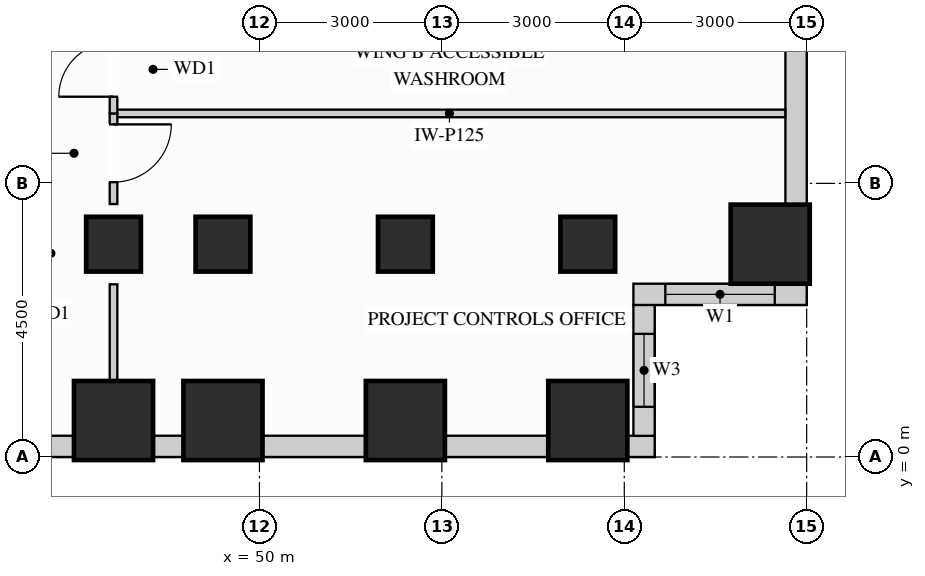
"""IFC4 building model, lengths in metres.
Left out: names, types, materials, properties, quantities, classifications, styles, units other than length and angle.
Written with IfcOpenShell. Run it as: python <this file> out.ifc"""

import sys

from ifc_helpers import new_model, si_unit, direction, frame, frame_2d, origin, origin_2d, place, context, subcontext, project, spatial, rectangle, extrude, source, transform, mapped, element, fill, save


model = new_model("IFC4")
c1 = context("Model", 3, precision=1e-05, world=origin(), true_north=direction((0.0, 1.0)))
c2 = subcontext(c1, "Body", "Model", "MODEL_VIEW")
j1 = project(units=[si_unit("LENGTHUNIT", "METRE"), si_unit("PLANEANGLEUNIT", "RADIAN")], contexts=[c1])
p1 = place(None, origin())
s1 = spatial("IfcSite", under=j1, at=p1, CompositionType="ELEMENT")
p2 = place(p1, origin())
s2 = spatial("IfcBuilding", under=s1, at=p2, CompositionType="ELEMENT")
p3 = place(p2, frame((0.0, 0.0, 47.7)))
s3 = spatial("IfcBuildingStorey", under=s2, at=p3, CompositionType="ELEMENT", Elevation=47.7)
m1 = source(origin(), c2, "Body", "SweptSolid", [
    extrude(rectangle(XDim=0.9, YDim=0.9, at=origin_2d()), origin(), (0.0, 0.0, 1.0), 3.38),
])
for number, where, z_axis, x_axis in (
    (1, (47.6, 3.5, 0.0), (0.0, 0.0, 1.0), (1.0, 0.0, 0.0)),
    (2, (49.4, 3.5, 0.0), (0.0, 0.0, 1.0), (1.0, 0.0, 0.0)),
    (3, (52.4, 3.5, 0.0), (0.0, 0.0, 1.0), (1.0, 0.0, 0.0)),
    (4, (55.4, 3.5, 0.0), (0.0, 0.0, 1.0), (1.0, 0.0, 0.0)),
):
    element("IfcColumn", number, at=place(p3, frame(where, z_axis=z_axis, x_axis=x_axis)), inside=s3, PredefinedType="COLUMN", context=c2, shape_type="MappedRepresentation", body=[
        mapped(m1, transform((0.0, 0.0, 0.0), x_axis=(1.0, 0.0, 0.0), y_axis=(0.0, 1.0, 0.0), z_axis=(0.0, 0.0, 1.0))),
    ])
m2 = source(origin(), c2, "Body", "SweptSolid", [
    extrude(rectangle(XDim=1.3, YDim=1.3, at=origin_2d()), origin(), (0.0, 0.0, 1.0), 3.38),
])
for number, where, z_axis, x_axis in (
    (5, (58.4, 3.5, 0.0), (0.0, 0.0, 1.0), (1.0, 0.0, 0.0)),
    (6, (47.6, 0.6, 0.0), (0.0, 0.0, 1.0), (1.0, 0.0, 0.0)),
    (7, (49.4, 0.6, 0.0), (0.0, 0.0, 1.0), (1.0, 0.0, 0.0)),
    (8, (52.4, 0.6, 0.0), (0.0, 0.0, 1.0), (1.0, 0.0, 0.0)),
    (9, (55.4, 0.6, 0.0), (0.0, 0.0, 1.0), (1.0, 0.0, 0.0)),
):
    element("IfcColumn", number, at=place(p3, frame(where, z_axis=z_axis, x_axis=x_axis)), inside=s3, PredefinedType="COLUMN", context=c2, shape_type="MappedRepresentation", body=[
        mapped(m2, transform((0.0, 0.0, 0.0), x_axis=(1.0, 0.0, 0.0), y_axis=(0.0, 1.0, 0.0), z_axis=(0.0, 0.0, 1.0))),
    ])
p4 = place(p3, frame((40.648, 0.175, 0.0), z_axis=(0.0, 0.0, 1.0), x_axis=(1.0, 0.0, 0.0)))
e10 = element("IfcWall", 10, at=p4, inside=s3, PredefinedType="SOLIDWALL", context=c2, shape_type="SweptSolid", body=[
    extrude(rectangle(XDim=6.304, YDim=0.35, at=frame_2d((3.152, 0.0))), origin(), (0.0, 0.0, 1.0), 2.51),
])
p5 = place(p4, frame((0.687, 0.0, 0.78)))
e11 = element("IfcOpeningElement", 11, at=p5, cuts=e10, PredefinedType="OPENING", context=c2, shape_type="SweptSolid", body=[
    extrude(rectangle(XDim=1.8, YDim=1.55, at=frame_2d((0.9, 0.775))), frame((0.0, 0.185, 0.0), z_axis=(0.0, -1.0, 0.0), x_axis=(1.0, 0.0, 0.0)), (0.0, 0.0, 1.0), 0.37),
])
p6 = place(p4, frame((2.855, 0.0, 0.78)))
e12 = element("IfcOpeningElement", 12, at=p6, cuts=e10, PredefinedType="OPENING", context=c2, shape_type="SweptSolid", body=[
    extrude(rectangle(XDim=1.8, YDim=1.55, at=frame_2d((0.9, 0.775))), frame((0.0, 0.185, 0.0), z_axis=(0.0, -1.0, 0.0), x_axis=(1.0, 0.0, 0.0)), (0.0, 0.0, 1.0), 0.37),
])
m3 = source(origin(), c2, "Body", "SweptSolid", [
    extrude(rectangle(XDim=0.504, YDim=0.35, at=frame_2d((0.252, 0.0))), origin(), (0.0, 0.0, 1.0), 3.365),
])
p7 = place(p3, frame((48.248, 0.175, 0.0), z_axis=(0.0, 0.0, 1.0), x_axis=(1.0, 0.0, 0.0)))
e13 = element("IfcWall", 13, at=p7, inside=s3, PredefinedType="SOLIDWALL", context=c2, shape_type="MappedRepresentation", body=[
    mapped(m3, transform((0.0, 0.0, 0.0), x_axis=(1.0, 0.0, 0.0), y_axis=(0.0, 1.0, 0.0), z_axis=(0.0, 0.0, 1.0))),
])
m4 = source(origin(), c2, "Body", "SweptSolid", [
    extrude(rectangle(XDim=1.704, YDim=0.35, at=frame_2d((0.852, 0.0))), origin(), (0.0, 0.0, 1.0), 2.51),
])
for number, where, z_axis, x_axis in (
    (14, (50.048, 0.175, 0.0), (0.0, 0.0, 1.0), (1.0, 0.0, 0.0)),
    (15, (53.048, 0.175, 0.0), (0.0, 0.0, 1.0), (1.0, 0.0, 0.0)),
):
    element("IfcWall", number, at=place(p3, frame(where, z_axis=z_axis, x_axis=x_axis)), inside=s3, PredefinedType="SOLIDWALL", context=c2, shape_type="MappedRepresentation", body=[
        mapped(m4, transform((0.0, 0.0, 0.0), x_axis=(1.0, 0.0, 0.0), y_axis=(0.0, 1.0, 0.0), z_axis=(0.0, 0.0, 1.0))),
    ])
m5 = source(origin(), c2, "Body", "SweptSolid", [
    extrude(rectangle(XDim=0.452, YDim=0.35, at=frame_2d((0.226, 0.0))), origin(), (0.0, 0.0, 1.0), 3.365),
])
p8 = place(p3, frame((56.048, 0.175, 0.0), z_axis=(0.0, 0.0, 1.0), x_axis=(1.0, 0.0, 0.0)))
e16 = element("IfcWall", 16, at=p8, inside=s3, PredefinedType="SOLIDWALL", context=c2, shape_type="MappedRepresentation", body=[
    mapped(m5, transform((0.0, 0.0, 0.0), x_axis=(1.0, 0.0, 0.0), y_axis=(0.0, 1.0, 0.0), z_axis=(0.0, 0.0, 1.0))),
])
p9 = place(p3, frame((56.325, 0.348, 0.0), z_axis=(0.0, 0.0, 1.0), x_axis=(0.0, 1.0, 0.0)))
e17 = element("IfcWall", 17, at=p9, inside=s3, PredefinedType="SOLIDWALL", context=c2, shape_type="SweptSolid", body=[
    extrude(rectangle(XDim=2.154, YDim=0.35, at=frame_2d((1.077, 0.0))), origin(), (0.0, 0.0, 1.0), 3.365),
])
p10 = place(p9, frame((0.477, 0.0, 0.78)))
e18 = element("IfcOpeningElement", 18, at=p10, cuts=e17, PredefinedType="OPENING", context=c2, shape_type="SweptSolid", body=[
    extrude(rectangle(XDim=1.2, YDim=2.1, at=frame_2d((0.6, 1.05))), frame((0.0, 0.185, 0.0), z_axis=(0.0, -1.0, 0.0), x_axis=(1.0, 0.0, 0.0)), (0.0, 0.0, 1.0), 0.37),
])
p11 = place(p3, frame((56.15, 2.675, 0.0), z_axis=(0.0, 0.0, 1.0), x_axis=(1.0, 0.0, 0.0)))
e19 = element("IfcWall", 19, at=p11, inside=s3, PredefinedType="SOLIDWALL", context=c2, shape_type="SweptSolid", body=[
    extrude(rectangle(XDim=2.85, YDim=0.35, at=frame_2d((1.425, 0.0))), origin(), (0.0, 0.0, 1.0), 3.365),
])
p12 = place(p11, frame((0.525, 0.0, 0.78)))
e20 = element("IfcOpeningElement", 20, at=p12, cuts=e19, PredefinedType="OPENING", context=c2, shape_type="SweptSolid", body=[
    extrude(rectangle(XDim=1.8, YDim=2.1, at=frame_2d((0.9, 1.05))), frame((0.0, 0.185, 0.0), z_axis=(0.0, -1.0, 0.0), x_axis=(1.0, 0.0, 0.0)), (0.0, 0.0, 1.0), 0.37),
])
m6 = source(origin(), c2, "Body", "SweptSolid", [
    extrude(rectangle(XDim=3.204, YDim=0.35, at=frame_2d((1.602, 0.0))), origin(), (0.0, 0.0, 1.0), 2.51),
])
p13 = place(p3, frame((58.825, 4.148, 0.0), z_axis=(0.0, 0.0, 1.0), x_axis=(0.0, 1.0, 0.0)))
e21 = element("IfcWall", 21, at=p13, inside=s3, PredefinedType="SOLIDWALL", context=c2, shape_type="MappedRepresentation", body=[
    mapped(m6, transform((0.0, 0.0, 0.0), x_axis=(1.0, 0.0, 0.0), y_axis=(0.0, 1.0, 0.0), z_axis=(0.0, 0.0, 1.0))),
])
m7 = source(origin(), c2, "Body", "SweptSolid", [
    extrude(rectangle(XDim=11.048, YDim=0.125, at=frame_2d((5.524, 0.0))), origin(), (0.0, 0.0, 1.0), 3.365),
])
p14 = place(p3, frame((47.6, 5.65, 0.0), z_axis=(0.0, 0.0, 1.0), x_axis=(1.0, 0.0, 0.0)))
e22 = element("IfcWall", 22, at=p14, inside=s3, PredefinedType="PARTITIONING", context=c2, shape_type="MappedRepresentation", body=[
    mapped(m7, transform((0.0, 0.0, 0.0), x_axis=(1.0, 0.0, 0.0), y_axis=(0.0, 1.0, 0.0), z_axis=(0.0, 0.0, 1.0))),
])
p15 = place(p3, frame((47.6, 4.16, 0.0), z_axis=(0.0, 0.0, 1.0), x_axis=(0.0, 1.0, 0.0)))
e23 = element("IfcWall", 23, at=p15, inside=s3, PredefinedType="PARTITIONING", context=c2, shape_type="SweptSolid", body=[
    extrude(rectangle(XDim=1.49, YDim=0.125, at=frame_2d((0.745, 0.0))), origin(), (0.0, 0.0, 1.0), 2.67),
])
p16 = place(p15, frame((0.36, 0.0, 0.0)))
e24 = element("IfcOpeningElement", 24, at=p16, cuts=e23, PredefinedType="OPENING", context=c2, shape_type="SweptSolid", body=[
    extrude(rectangle(XDim=0.95, YDim=2.15, at=frame_2d((0.475, 1.075))), frame((0.0, 0.073, 0.0), z_axis=(0.0, -1.0, 0.0), x_axis=(1.0, 0.0, 0.0)), (0.0, 0.0, 1.0), 0.145),
])
m8 = source(origin(), c2, "Body", "SweptSolid", [
    extrude(rectangle(XDim=1.58, YDim=0.125, at=frame_2d((0.79, 0.0))), origin(), (0.0, 0.0, 1.0), 2.67),
])
p17 = place(p3, frame((47.6, 1.26, 0.0), z_axis=(0.0, 0.0, 1.0), x_axis=(0.0, 1.0, 0.0)))
e25 = element("IfcWall", 25, at=p17, inside=s3, PredefinedType="PARTITIONING", context=c2, shape_type="MappedRepresentation", body=[
    mapped(m8, transform((0.0, 0.0, 0.0), x_axis=(1.0, 0.0, 0.0), y_axis=(0.0, 1.0, 0.0), z_axis=(0.0, 0.0, 1.0))),
])
p18 = place(p3, frame((47.6, 5.65, 0.0), z_axis=(0.0, 0.0, 1.0), x_axis=(0.0, 1.0, 0.0)))
e26 = element("IfcWall", 26, at=p18, inside=s3, PredefinedType="PARTITIONING", context=c2, shape_type="SweptSolid", body=[
    extrude(rectangle(XDim=1.5, YDim=0.125, at=frame_2d((0.75, 0.0))), origin(), (0.0, 0.0, 1.0), 2.67),
])
p19 = place(p18, frame((0.275, 0.0, 0.0)))
e27 = element("IfcOpeningElement", 27, at=p19, cuts=e26, PredefinedType="OPENING", context=c2, shape_type="SweptSolid", body=[
    extrude(rectangle(XDim=0.9, YDim=2.15, at=frame_2d((0.45, 1.075))), frame((0.0, 0.073, 0.0), z_axis=(0.0, -1.0, 0.0), x_axis=(1.0, 0.0, 0.0)), (0.0, 0.0, 1.0), 0.145),
])
m9 = source(origin(), c2, "Body", "SweptSolid", [
    extrude(rectangle(XDim=0.95, YDim=2.15, at=frame_2d((0.475, 1.075))), frame((0.0, 0.025, 0.0), z_axis=(0.0, -1.0, 0.0), x_axis=(1.0, 0.0, 0.0)), (0.0, 0.0, 1.0), 0.05),
])
p20 = place(p16, origin())
e28 = element("IfcDoor", 28, at=p20, inside=s3, OperationType="SINGLE_SWING_RIGHT", PredefinedType="DOOR", context=c2, shape_type="MappedRepresentation", body=[
    mapped(m9, transform((0.0, 0.0, 0.0), x_axis=(1.0, 0.0, 0.0), y_axis=(0.0, 1.0, 0.0), z_axis=(0.0, 0.0, 1.0))),
])
fill(e24, e28)
m10 = source(origin(), c2, "Body", "SweptSolid", [
    extrude(rectangle(XDim=0.9, YDim=2.15, at=frame_2d((0.45, 1.075))), frame((0.0, 0.025, 0.0), z_axis=(0.0, -1.0, 0.0), x_axis=(1.0, 0.0, 0.0)), (0.0, 0.0, 1.0), 0.05),
])
p21 = place(p19, origin())
e29 = element("IfcDoor", 29, at=p21, inside=s3, OperationType="SINGLE_SWING_LEFT", PredefinedType="DOOR", context=c2, shape_type="MappedRepresentation", body=[
    mapped(m10, transform((0.0, 0.0, 0.0), x_axis=(1.0, 0.0, 0.0), y_axis=(0.0, 1.0, 0.0), z_axis=(0.0, 0.0, 1.0))),
])
fill(e27, e29)
m11 = source(origin(), c2, "Body", "SweptSolid", [
    extrude(rectangle(XDim=1.8, YDim=2.1, at=frame_2d((0.9, 1.05))), frame((0.0, 0.03, 0.0), z_axis=(0.0, -1.0, 0.0), x_axis=(1.0, 0.0, 0.0)), (0.0, 0.0, 1.0), 0.06),
])
p22 = place(p12, origin())
e30 = element("IfcWindow", 30, at=p22, inside=s3, PartitioningType="SINGLE_PANEL", PredefinedType="WINDOW", context=c2, shape_type="MappedRepresentation", body=[
    mapped(m11, transform((0.0, 0.0, 0.0), x_axis=(1.0, 0.0, 0.0), y_axis=(0.0, 1.0, 0.0), z_axis=(0.0, 0.0, 1.0))),
])
fill(e20, e30)
m12 = source(origin(), c2, "Body", "SweptSolid", [
    extrude(rectangle(XDim=1.2, YDim=2.1, at=frame_2d((0.6, 1.05))), frame((0.0, 0.03, 0.0), z_axis=(0.0, -1.0, 0.0), x_axis=(1.0, 0.0, 0.0)), (0.0, 0.0, 1.0), 0.06),
])
p23 = place(p10, origin())
e31 = element("IfcWindow", 31, at=p23, inside=s3, PartitioningType="SINGLE_PANEL", PredefinedType="WINDOW", context=c2, shape_type="MappedRepresentation", body=[
    mapped(m12, transform((0.0, 0.0, 0.0), x_axis=(1.0, 0.0, 0.0), y_axis=(0.0, 1.0, 0.0), z_axis=(0.0, 0.0, 1.0))),
])
fill(e18, e31)
save(model, sys.argv[1])
